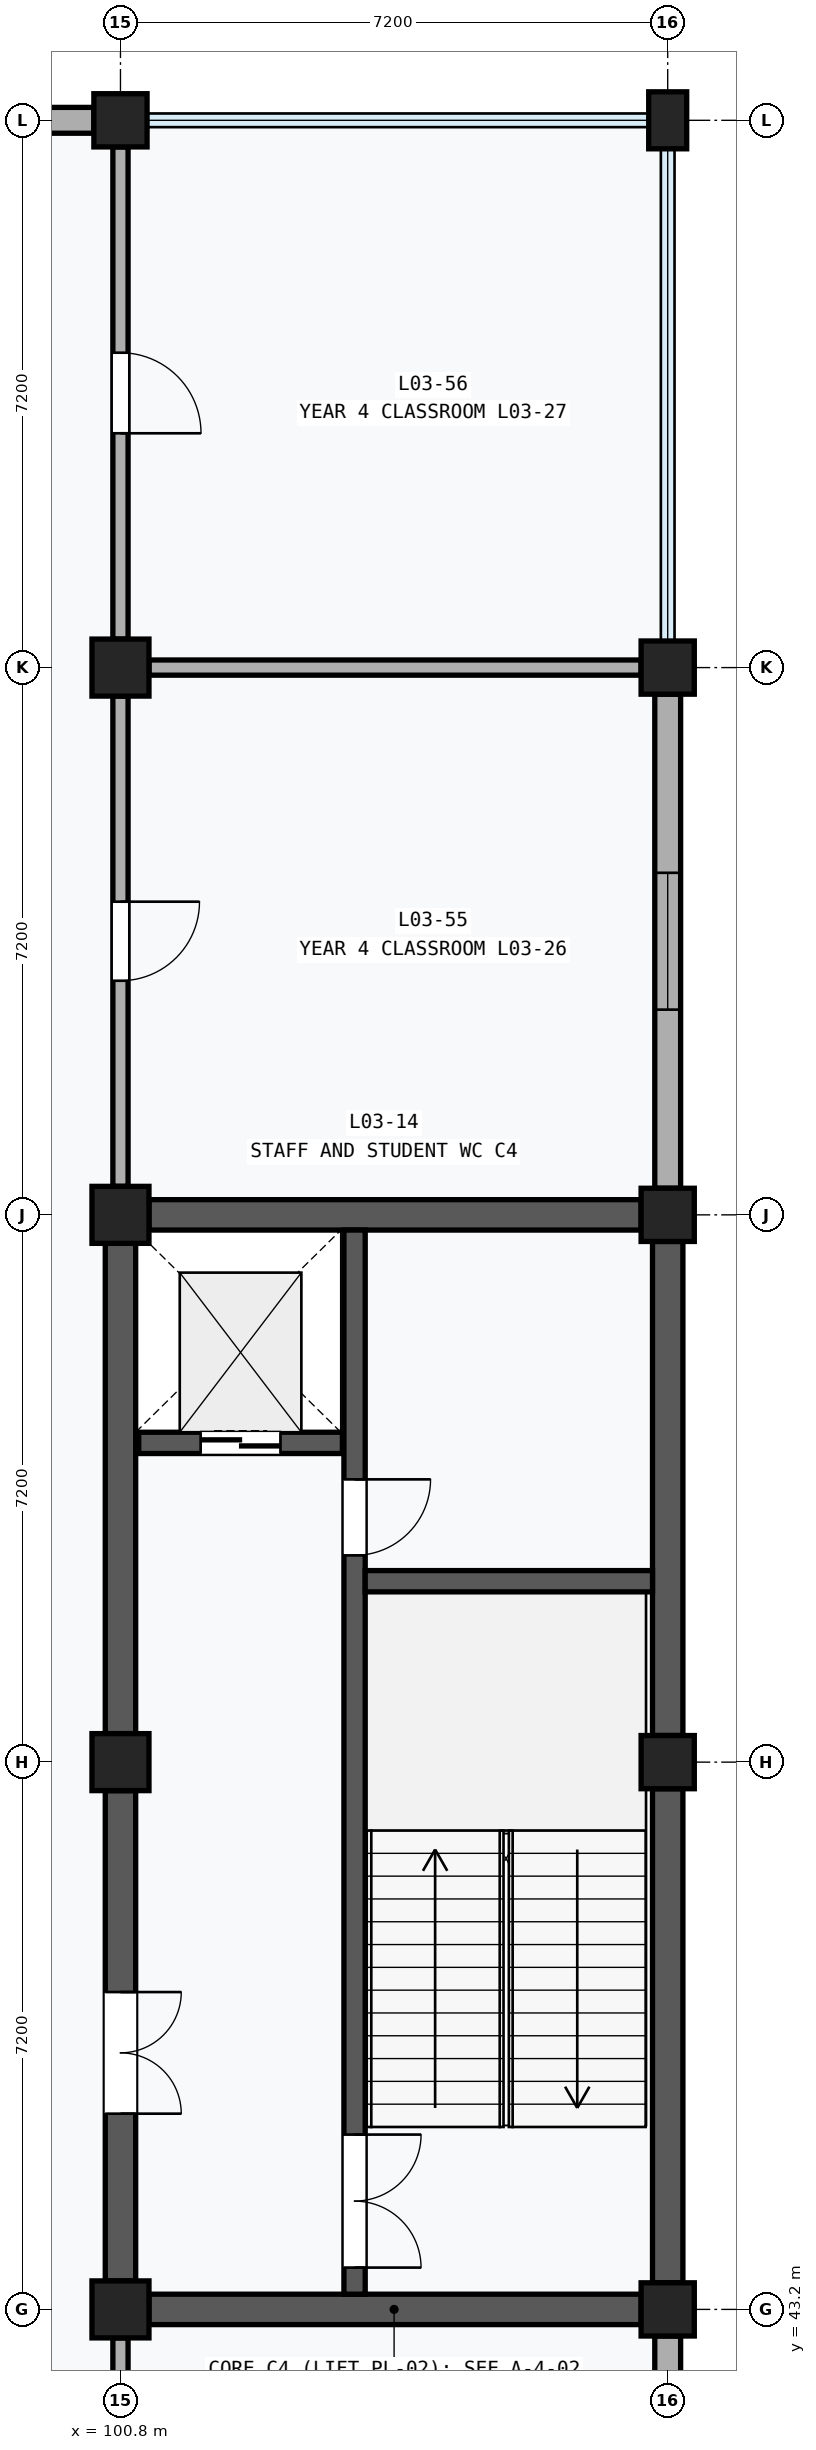
"""IFC4 building model, lengths in metres.
Left out: names, types, materials, properties, quantities, classifications, styles, units other than length and angle.
Written with IfcOpenShell. Run it as: python <this file> out.ifc"""

import sys

from ifc_helpers import new_model, si_unit, direction, frame, frame_2d, origin, origin_2d, place, context, subcontext, project, spatial, rectangle, extrude, element, fill, save


model = new_model("IFC4")
c1 = context("Model", 3, precision=1e-05, world=origin(), true_north=direction((0.0, 1.0)))
c2 = subcontext(c1, "Body", "Model", "MODEL_VIEW")
j1 = project(units=[si_unit("LENGTHUNIT", "METRE"), si_unit("PLANEANGLEUNIT", "RADIAN")], contexts=[c1])
p1 = place(None, origin())
s1 = spatial("IfcSite", under=j1, at=p1, CompositionType="ELEMENT")
p2 = place(p1, origin())
s2 = spatial("IfcBuilding", under=s1, at=p2, CompositionType="ELEMENT")
p3 = place(p2, frame((0.0, 0.0, 14.4)))
s3 = spatial("IfcBuildingStorey", under=s2, at=p3, CompositionType="ELEMENT", Elevation=14.4)
for number, where, z_axis, x_axis in (
    (1, (100.8, 43.2, 0.0), (0.0, 0.0, 1.0), (1.0, 0.0, 0.0)),
    (2, (100.8, 50.4, 0.0), (0.0, 0.0, 1.0), (1.0, 0.0, 0.0)),
    (3, (100.8, 57.6, 0.0), (0.0, 0.0, 1.0), (1.0, 0.0, 0.0)),
    (4, (100.8, 64.8, 0.0), (0.0, 0.0, 1.0), (1.0, 0.0, 0.0)),
):
    element("IfcColumn", number, at=place(p3, frame(where, z_axis=z_axis, x_axis=x_axis)), inside=s3, PredefinedType="COLUMN", context=c2, shape_type="SweptSolid", body=[
        extrude(rectangle(XDim=0.75, YDim=0.75, at=origin_2d()), origin(), (0.0, 0.0, 1.0), 4.2),
    ])
for number, where, z_axis, x_axis in (
    (5, (100.8, 72.0, 0.0), (0.0, 0.0, 1.0), (1.0, 0.0, 0.0)),
    (6, (108.0, 43.2, 0.0), (0.0, 0.0, 1.0), (1.0, 0.0, 0.0)),
    (7, (108.0, 50.4, 0.0), (0.0, 0.0, 1.0), (1.0, 0.0, 0.0)),
    (8, (108.0, 57.6, 0.0), (0.0, 0.0, 1.0), (1.0, 0.0, 0.0)),
    (9, (108.0, 64.8, 0.0), (0.0, 0.0, 1.0), (1.0, 0.0, 0.0)),
):
    element("IfcColumn", number, at=place(p3, frame(where, z_axis=z_axis, x_axis=x_axis)), inside=s3, PredefinedType="COLUMN", context=c2, shape_type="SweptSolid", body=[
        extrude(rectangle(XDim=0.7, YDim=0.7, at=origin_2d()), origin(), (0.0, 0.0, 1.0), 4.2),
    ])
p4 = place(p3, frame((108.0, 72.0, 0.0), z_axis=(0.0, 0.0, 1.0), x_axis=(1.0, 0.0, 0.0)))
e10 = element("IfcColumn", 10, at=p4, inside=s3, PredefinedType="PILASTER", context=c2, shape_type="SweptSolid", body=[
    extrude(rectangle(XDim=0.5, YDim=0.75, at=origin_2d()), origin(), (0.0, 0.0, 1.0), 4.2),
])
p5 = place(p3, frame((93.95, 72.0, 0.0), z_axis=(0.0, 0.0, 1.0), x_axis=(1.0, 0.0, 0.0)))
e11 = element("IfcWall", 11, at=p5, inside=s3, PredefinedType="SOLIDWALL", context=c2, shape_type="SweptSolid", body=[
    extrude(rectangle(XDim=6.5, YDim=0.34, at=frame_2d((3.25, 0.0))), origin(), (0.0, 0.0, 1.0), 3.31),
])
p6 = place(p5, frame((2.35, 0.0, 0.85)))
e12 = element("IfcOpeningElement", 12, at=p6, cuts=e11, PredefinedType="OPENING", context=c2, shape_type="SweptSolid", body=[
    extrude(rectangle(XDim=1.8, YDim=2.0, at=frame_2d((0.9, 1.0))), frame((0.0, 0.182, 0.0), z_axis=(0.0, -1.0, 0.0), x_axis=(1.0, 0.0, 0.0)), (0.0, 0.0, 1.0), 0.364),
])
p7 = place(p3, frame((108.0, 36.375, 0.0), z_axis=(0.0, 0.0, 1.0), x_axis=(0.0, 1.0, 0.0)))
e13 = element("IfcWall", 13, at=p7, inside=s3, PredefinedType="SOLIDWALL", context=c2, shape_type="SweptSolid", body=[
    extrude(rectangle(XDim=6.475, YDim=0.34, at=frame_2d((3.238, 0.0))), origin(), (0.0, 0.0, 1.0), 3.31),
])
p8 = place(p7, frame((1.738, 0.0, 0.9)))
e14 = element("IfcOpeningElement", 14, at=p8, cuts=e13, PredefinedType="OPENING", context=c2, shape_type="SweptSolid", body=[
    extrude(rectangle(XDim=3.0, YDim=1.8, at=frame_2d((1.5, 0.9))), frame((0.0, 0.182, 0.0), z_axis=(0.0, -1.0, 0.0), x_axis=(1.0, 0.0, 0.0)), (0.0, 0.0, 1.0), 0.364),
])
p9 = place(p3, frame((108.0, 57.95, 0.0), z_axis=(0.0, 0.0, 1.0), x_axis=(0.0, 1.0, 0.0)))
e15 = element("IfcWall", 15, at=p9, inside=s3, PredefinedType="SOLIDWALL", context=c2, shape_type="SweptSolid", body=[
    extrude(rectangle(XDim=6.5, YDim=0.34, at=frame_2d((3.25, 0.0))), origin(), (0.0, 0.0, 1.0), 3.31),
])
p10 = place(p9, frame((2.35, 0.0, 0.85)))
e16 = element("IfcOpeningElement", 16, at=p10, cuts=e15, PredefinedType="OPENING", context=c2, shape_type="SweptSolid", body=[
    extrude(rectangle(XDim=1.8, YDim=2.0, at=frame_2d((0.9, 1.0))), frame((0.0, 0.182, 0.0), z_axis=(0.0, -1.0, 0.0), x_axis=(1.0, 0.0, 0.0)), (0.0, 0.0, 1.0), 0.364),
])
p11 = place(p3, frame((100.8, 43.575, 0.0), z_axis=(0.0, 0.0, 1.0), x_axis=(0.0, 1.0, 0.0)))
e17 = element("IfcWall", 17, at=p11, inside=s3, PredefinedType="SHEAR", context=c2, shape_type="SweptSolid", body=[
    extrude(rectangle(XDim=6.45, YDim=0.4, at=frame_2d((3.225, 0.0))), origin(), (0.0, 0.0, 1.0), 3.17),
])
p12 = place(p11, frame((2.2, 0.0, 0.0)))
e18 = element("IfcOpeningElement", 18, at=p12, cuts=e17, PredefinedType="OPENING", context=c2, shape_type="SweptSolid", body=[
    extrude(rectangle(XDim=1.6, YDim=2.2, at=frame_2d((0.8, 1.1))), frame((0.0, 0.212, 0.0), z_axis=(0.0, -1.0, 0.0), x_axis=(1.0, 0.0, 0.0)), (0.0, 0.0, 1.0), 0.424),
])
p13 = place(p3, frame((100.8, 50.775, 0.0), z_axis=(0.0, 0.0, 1.0), x_axis=(0.0, 1.0, 0.0)))
e19 = element("IfcWall", 19, at=p13, inside=s3, PredefinedType="SHEAR", context=c2, shape_type="SweptSolid", body=[
    extrude(rectangle(XDim=6.45, YDim=0.4, at=frame_2d((3.225, 0.0))), origin(), (0.0, 0.0, 1.0), 3.17),
])
for number, where, z_axis, x_axis in (
    (20, (108.0, 43.55, 0.0), (0.0, 0.0, 1.0), (0.0, 1.0, 0.0)),
    (21, (108.0, 50.75, 0.0), (0.0, 0.0, 1.0), (0.0, 1.0, 0.0)),
):
    element("IfcWall", number, at=place(p3, frame(where, z_axis=z_axis, x_axis=x_axis)), inside=s3, PredefinedType="SHEAR", context=c2, shape_type="SweptSolid", body=[
        extrude(rectangle(XDim=6.5, YDim=0.4, at=frame_2d((3.25, 0.0))), origin(), (0.0, 0.0, 1.0), 3.31),
    ])
p14 = place(p3, frame((101.175, 43.2, 0.0), z_axis=(0.0, 0.0, 1.0), x_axis=(1.0, 0.0, 0.0)))
e22 = element("IfcWall", 22, at=p14, inside=s3, PredefinedType="SHEAR", context=c2, shape_type="SweptSolid", body=[
    extrude(rectangle(XDim=6.475, YDim=0.4, at=frame_2d((3.237, 0.0))), origin(), (0.0, 0.0, 1.0), 3.24),
])
p15 = place(p3, frame((101.175, 57.6, 0.0), z_axis=(0.0, 0.0, 1.0), x_axis=(1.0, 0.0, 0.0)))
e23 = element("IfcWall", 23, at=p15, inside=s3, PredefinedType="SHEAR", context=c2, shape_type="SweptSolid", body=[
    extrude(rectangle(XDim=6.475, YDim=0.4, at=frame_2d((3.237, 0.0))), origin(), (0.0, 0.0, 1.0), 3.17),
])
p16 = place(p3, frame((103.88, 43.4, 0.0), z_axis=(0.0, 0.0, 1.0), x_axis=(0.0, 1.0, 0.0)))
e24 = element("IfcWall", 24, at=p16, inside=s3, PredefinedType="SHEAR", context=c2, shape_type="SweptSolid", body=[
    extrude(rectangle(XDim=14.0, YDim=0.28, at=frame_2d((7.0, 0.0))), origin(), (0.0, 0.0, 1.0), 3.94),
])
p17 = place(p16, frame((0.35, 0.0, 0.0)))
e25 = element("IfcOpeningElement", 25, at=p17, cuts=e24, PredefinedType="OPENING", context=c2, shape_type="SweptSolid", body=[
    extrude(rectangle(XDim=1.75, YDim=2.15, at=frame_2d((0.875, 1.075))), frame((0.0, 0.152, 0.0), z_axis=(0.0, -1.0, 0.0), x_axis=(1.0, 0.0, 0.0)), (0.0, 0.0, 1.0), 0.304),
])
p18 = place(p16, frame((9.72, 0.0, 0.0)))
e26 = element("IfcOpeningElement", 26, at=p18, cuts=e24, PredefinedType="OPENING", context=c2, shape_type="SweptSolid", body=[
    extrude(rectangle(XDim=1.0, YDim=2.15, at=frame_2d((0.5, 1.075))), frame((0.0, 0.152, 0.0), z_axis=(0.0, -1.0, 0.0), x_axis=(1.0, 0.0, 0.0)), (0.0, 0.0, 1.0), 0.304),
])
p19 = place(p3, frame((104.02, 52.78, 0.0), z_axis=(0.0, 0.0, 1.0), x_axis=(1.0, 0.0, 0.0)))
e27 = element("IfcWall", 27, at=p19, inside=s3, PredefinedType="SHEAR", context=c2, shape_type="SweptSolid", body=[
    extrude(rectangle(XDim=3.78, YDim=0.28, at=frame_2d((1.89, 0.0))), origin(), (0.0, 0.0, 1.0), 3.94),
])
p20 = place(p3, frame((101.04, 54.6, 0.0), z_axis=(0.0, 0.0, 1.0), x_axis=(1.0, 0.0, 0.0)))
e28 = element("IfcWall", 28, at=p20, inside=s3, PredefinedType="SHEAR", context=c2, shape_type="SweptSolid", body=[
    extrude(rectangle(XDim=2.68, YDim=0.28, at=frame_2d((1.34, 0.0))), origin(), (0.0, 0.0, 1.0), 3.94),
])
p21 = place(p20, frame((0.815, 0.0, 0.0)))
e29 = element("IfcOpeningElement", 29, at=p21, cuts=e28, PredefinedType="OPENING", context=c2, shape_type="SweptSolid", body=[
    extrude(rectangle(XDim=1.05, YDim=2.2, at=frame_2d((0.525, 1.1))), frame((0.0, 0.152, 0.0), z_axis=(0.0, -1.0, 0.0), x_axis=(1.0, 0.0, 0.0)), (0.0, 0.0, 1.0), 0.304),
])
p22 = place(p3, frame((100.8, 36.375, 0.0), z_axis=(0.0, 0.0, 1.0), x_axis=(0.0, 1.0, 0.0)))
e30 = element("IfcWall", 30, at=p22, inside=s3, PredefinedType="PARTITIONING", context=c2, shape_type="SweptSolid", body=[
    extrude(rectangle(XDim=6.45, YDim=0.2, at=frame_2d((3.225, 0.0))), origin(), (0.0, 0.0, 1.0), 3.17),
])
p23 = place(p22, frame((2.715, 0.0, 0.0)))
e31 = element("IfcOpeningElement", 31, at=p23, cuts=e30, PredefinedType="OPENING", context=c2, shape_type="SweptSolid", body=[
    extrude(rectangle(XDim=1.02, YDim=2.12, at=frame_2d((0.51, 1.06))), frame((0.0, 0.112, 0.0), z_axis=(0.0, -1.0, 0.0), x_axis=(1.0, 0.0, 0.0)), (0.0, 0.0, 1.0), 0.224),
])
p24 = place(p3, frame((101.175, 64.8, 0.0), z_axis=(0.0, 0.0, 1.0), x_axis=(1.0, 0.0, 0.0)))
e32 = element("IfcWall", 32, at=p24, inside=s3, PredefinedType="PARTITIONING", context=c2, shape_type="SweptSolid", body=[
    extrude(rectangle(XDim=6.475, YDim=0.2, at=frame_2d((3.237, 0.0))), origin(), (0.0, 0.0, 1.0), 3.17),
])
p25 = place(p3, frame((100.8, 57.975, 0.0), z_axis=(0.0, 0.0, 1.0), x_axis=(0.0, 1.0, 0.0)))
e33 = element("IfcWall", 33, at=p25, inside=s3, PredefinedType="PARTITIONING", context=c2, shape_type="SweptSolid", body=[
    extrude(rectangle(XDim=6.45, YDim=0.2, at=frame_2d((3.225, 0.0))), origin(), (0.0, 0.0, 1.0), 3.17),
])
p26 = place(p25, frame((2.705, 0.0, 0.0)))
e34 = element("IfcOpeningElement", 34, at=p26, cuts=e33, PredefinedType="OPENING", context=c2, shape_type="SweptSolid", body=[
    extrude(rectangle(XDim=1.04, YDim=2.14, at=frame_2d((0.52, 1.07))), frame((0.0, 0.112, 0.0), z_axis=(0.0, -1.0, 0.0), x_axis=(1.0, 0.0, 0.0)), (0.0, 0.0, 1.0), 0.224),
])
p27 = place(p3, frame((100.8, 65.175, 0.0), z_axis=(0.0, 0.0, 1.0), x_axis=(0.0, 1.0, 0.0)))
e35 = element("IfcWall", 35, at=p27, inside=s3, PredefinedType="PARTITIONING", context=c2, shape_type="SweptSolid", body=[
    extrude(rectangle(XDim=6.475, YDim=0.2, at=frame_2d((3.237, 0.0))), origin(), (0.0, 0.0, 1.0), 3.17),
])
p28 = place(p27, frame((2.708, 0.0, 0.0)))
e36 = element("IfcOpeningElement", 36, at=p28, cuts=e35, PredefinedType="OPENING", context=c2, shape_type="SweptSolid", body=[
    extrude(rectangle(XDim=1.06, YDim=2.16, at=frame_2d((0.53, 1.08))), frame((0.0, 0.112, 0.0), z_axis=(0.0, -1.0, 0.0), x_axis=(1.0, 0.0, 0.0)), (0.0, 0.0, 1.0), 0.224),
])
p29 = place(p10, origin())
e37 = element("IfcWindow", 37, at=p29, inside=s3, PartitioningType="SINGLE_PANEL", PredefinedType="WINDOW", context=c2, shape_type="SweptSolid", body=[
    extrude(rectangle(XDim=1.8, YDim=2.0, at=frame_2d((0.9, 1.0))), frame((0.0, 0.03, 0.0), z_axis=(0.0, -1.0, 0.0), x_axis=(1.0, 0.0, 0.0)), (0.0, 0.0, 1.0), 0.06),
])
fill(e16, e37)
p30 = place(p12, frame((1.6, 0.0, 0.0), z_axis=(0.0, 0.0, 1.0), x_axis=(-1.0, 0.0, 0.0)))
e38 = element("IfcDoor", 38, at=p30, inside=s3, OperationType="DOUBLE_DOOR_SINGLE_SWING", PredefinedType="DOOR", context=c2, shape_type="SweptSolid", body=[
    extrude(rectangle(XDim=1.6, YDim=2.2, at=frame_2d((0.8, 1.1))), frame((0.0, 0.025, 0.0), z_axis=(0.0, -1.0, 0.0), x_axis=(1.0, 0.0, 0.0)), (0.0, 0.0, 1.0), 0.05),
])
fill(e18, e38)
p31 = place(p17, frame((1.75, 0.0, 0.0), z_axis=(0.0, 0.0, 1.0), x_axis=(-1.0, 0.0, 0.0)))
e39 = element("IfcDoor", 39, at=p31, inside=s3, OperationType="DOUBLE_DOOR_SINGLE_SWING", PredefinedType="DOOR", context=c2, shape_type="SweptSolid", body=[
    extrude(rectangle(XDim=1.75, YDim=2.15, at=frame_2d((0.875, 1.075))), frame((0.0, 0.025, 0.0), z_axis=(0.0, -1.0, 0.0), x_axis=(1.0, 0.0, 0.0)), (0.0, 0.0, 1.0), 0.05),
])
fill(e25, e39)
p32 = place(p18, frame((1.0, 0.0, 0.0), z_axis=(0.0, 0.0, 1.0), x_axis=(-1.0, 0.0, 0.0)))
e40 = element("IfcDoor", 40, at=p32, inside=s3, OperationType="SINGLE_SWING_LEFT", PredefinedType="DOOR", context=c2, shape_type="SweptSolid", body=[
    extrude(rectangle(XDim=1.0, YDim=2.15, at=frame_2d((0.5, 1.075))), frame((0.0, 0.025, 0.0), z_axis=(0.0, -1.0, 0.0), x_axis=(1.0, 0.0, 0.0)), (0.0, 0.0, 1.0), 0.05),
])
fill(e26, e40)
p33 = place(p21, frame((1.05, 0.0, 0.0), z_axis=(0.0, 0.0, 1.0), x_axis=(-1.0, 0.0, 0.0)))
e41 = element("IfcDoor", 41, at=p33, inside=s3, OperationType="DOUBLE_DOOR_SLIDING", PredefinedType="DOOR", context=c2, shape_type="SweptSolid", body=[
    extrude(rectangle(XDim=1.05, YDim=2.2, at=frame_2d((0.525, 1.1))), frame((0.0, 0.025, 0.0), z_axis=(0.0, -1.0, 0.0), x_axis=(1.0, 0.0, 0.0)), (0.0, 0.0, 1.0), 0.05),
])
fill(e29, e41)
p34 = place(p26, frame((1.04, 0.0, 0.0), z_axis=(0.0, 0.0, 1.0), x_axis=(-1.0, 0.0, 0.0)))
e42 = element("IfcDoor", 42, at=p34, inside=s3, OperationType="SINGLE_SWING_LEFT", PredefinedType="DOOR", context=c2, shape_type="SweptSolid", body=[
    extrude(rectangle(XDim=1.04, YDim=2.14, at=frame_2d((0.52, 1.07))), frame((0.0, 0.025, 0.0), z_axis=(0.0, -1.0, 0.0), x_axis=(1.0, 0.0, 0.0)), (0.0, 0.0, 1.0), 0.05),
])
fill(e34, e42)
p35 = place(p28, frame((1.06, 0.0, 0.0), z_axis=(0.0, 0.0, 1.0), x_axis=(-1.0, 0.0, 0.0)))
e43 = element("IfcDoor", 43, at=p35, inside=s3, OperationType="SINGLE_SWING_RIGHT", PredefinedType="DOOR", context=c2, shape_type="SweptSolid", body=[
    extrude(rectangle(XDim=1.06, YDim=2.16, at=frame_2d((0.53, 1.08))), frame((0.0, 0.025, 0.0), z_axis=(0.0, -1.0, 0.0), x_axis=(1.0, 0.0, 0.0)), (0.0, 0.0, 1.0), 0.05),
])
fill(e36, e43)
save(model, sys.argv[1])
